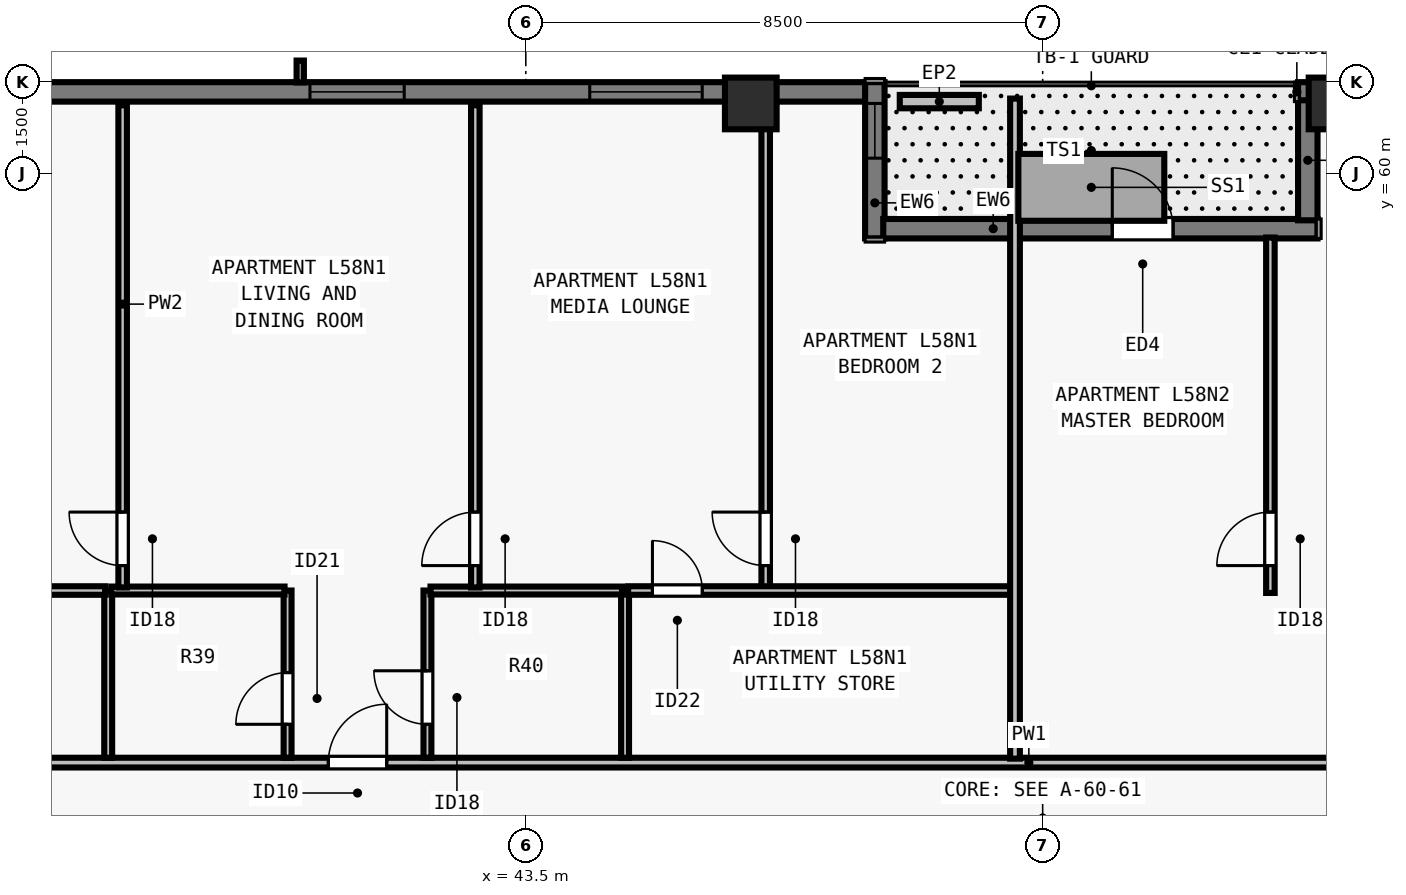
"""IFC4 building model, lengths in metres.
Left out: names, types, materials, properties, quantities, classifications, styles, units other than length and angle.
Written with IfcOpenShell. Run it as: python <this file> out.ifc"""

import sys

from ifc_helpers import new_model, si_unit, direction, frame, frame_2d, origin, origin_2d, place, context, subcontext, project, spatial, rectangle, extrude, element, fill, save


model = new_model("IFC4")
c1 = context("Model", 3, precision=1e-05, world=origin(), true_north=direction((0.0, 1.0)))
c2 = subcontext(c1, "Body", "Model", "MODEL_VIEW")
j1 = project(units=[si_unit("LENGTHUNIT", "METRE"), si_unit("PLANEANGLEUNIT", "RADIAN")], contexts=[c1])
p1 = place(None, origin())
s1 = spatial("IfcSite", under=j1, at=p1, CompositionType="ELEMENT")
p2 = place(p1, origin())
s2 = spatial("IfcBuilding", under=s1, at=p2, CompositionType="ELEMENT")
p3 = place(p2, frame((0.0, 0.0, 213.0)))
s3 = spatial("IfcBuildingStorey", under=s2, at=p3, CompositionType="ELEMENT", Elevation=213.0)
for number, where, z_axis, x_axis in (
    (1, (56.8, 61.15, 0.0), (0.0, 0.0, 1.0), (1.0, 0.0, 0.0)),
    (2, (47.2, 61.15, 0.0), (0.0, 0.0, 1.0), (1.0, 0.0, 0.0)),
):
    element("IfcColumn", number, at=place(p3, frame(where, z_axis=z_axis, x_axis=x_axis)), inside=s3, PredefinedType="COLUMN", context=c2, shape_type="SweptSolid", body=[
        extrude(rectangle(XDim=0.85, YDim=0.85, at=origin_2d()), origin(), (0.0, 0.0, 1.0), 3.5),
    ])
p4 = place(p3, frame((56.2, 61.34, 0.0), z_axis=(0.0, 0.0, 1.0), x_axis=(1.0, 0.0, 0.0)))
e3 = element("IfcWall", 3, at=p4, inside=s3, PredefinedType="SOLIDWALL", context=c2, shape_type="SweptSolid", body=[
    extrude(rectangle(XDim=13.002, YDim=0.32, at=frame_2d((6.501, 0.0))), origin(), (0.0, 0.0, 1.0), 3.29),
])
p5 = place(p4, frame((2.45, 0.0, 0.8)))
e4 = element("IfcOpeningElement", 4, at=p5, cuts=e3, PredefinedType="OPENING", context=c2, shape_type="SweptSolid", body=[
    extrude(rectangle(XDim=1.55, YDim=1.678, at=frame_2d((0.775, 0.839))), frame((0.0, 0.17, 0.0), z_axis=(0.0, -1.0, 0.0), x_axis=(1.0, 0.0, 0.0)), (0.0, 0.0, 1.0), 0.34),
])
p6 = place(p4, frame((5.802, 0.0, 0.8)))
e5 = element("IfcOpeningElement", 5, at=p6, cuts=e3, PredefinedType="OPENING", context=c2, shape_type="SweptSolid", body=[
    extrude(rectangle(XDim=1.85, YDim=1.678, at=frame_2d((0.925, 0.839))), frame((0.0, 0.17, 0.0), z_axis=(0.0, -1.0, 0.0), x_axis=(1.0, 0.0, 0.0)), (0.0, 0.0, 1.0), 0.34),
])
p7 = place(p3, frame((34.5, 61.34, 0.0), z_axis=(0.0, 0.0, 1.0), x_axis=(1.0, 0.0, 0.0)))
e6 = element("IfcWall", 6, at=p7, inside=s3, PredefinedType="SOLIDWALL", context=c2, shape_type="SweptSolid", body=[
    extrude(rectangle(XDim=14.602, YDim=0.32, at=frame_2d((7.301, 0.0))), origin(), (0.0, 0.0, 1.0), 3.29),
])
p8 = place(p7, frame((5.45, 0.0, 0.8)))
e7 = element("IfcOpeningElement", 7, at=p8, cuts=e6, PredefinedType="OPENING", context=c2, shape_type="SweptSolid", body=[
    extrude(rectangle(XDim=1.55, YDim=1.678, at=frame_2d((0.775, 0.839))), frame((0.0, 0.17, 0.0), z_axis=(0.0, -1.0, 0.0), x_axis=(1.0, 0.0, 0.0)), (0.0, 0.0, 1.0), 0.34),
])
p9 = place(p7, frame((10.052, 0.0, 0.8)))
e8 = element("IfcOpeningElement", 8, at=p9, cuts=e6, PredefinedType="OPENING", context=c2, shape_type="SweptSolid", body=[
    extrude(rectangle(XDim=1.85, YDim=1.678, at=frame_2d((0.925, 0.839))), frame((0.0, 0.17, 0.0), z_axis=(0.0, -1.0, 0.0), x_axis=(1.0, 0.0, 0.0)), (0.0, 0.0, 1.0), 0.34),
])
p10 = place(p3, frame((49.24, 61.5, 0.0), z_axis=(0.0, 0.0, 1.0), x_axis=(0.0, -1.0, 0.0)))
e9 = element("IfcWall", 9, at=p10, inside=s3, PredefinedType="SOLIDWALL", context=c2, shape_type="SweptSolid", body=[
    extrude(rectangle(XDim=2.57, YDim=0.32, at=frame_2d((1.285, 0.0))), origin(), (0.0, 0.0, 1.0), 3.29),
])
p11 = place(p10, frame((0.35, 0.0, 0.8)))
e10 = element("IfcOpeningElement", 10, at=p11, cuts=e9, PredefinedType="OPENING", context=c2, shape_type="SweptSolid", body=[
    extrude(rectangle(XDim=0.9, YDim=1.678, at=frame_2d((0.45, 0.839))), frame((0.0, 0.17, 0.0), z_axis=(0.0, -1.0, 0.0), x_axis=(1.0, 0.0, 0.0)), (0.0, 0.0, 1.0), 0.34),
])
p12 = place(p3, frame((49.378, 59.09, 0.0), z_axis=(0.0, 0.0, 1.0), x_axis=(1.0, 0.0, 0.0)))
e11 = element("IfcWall", 11, at=p12, inside=s3, PredefinedType="SOLIDWALL", context=c2, shape_type="SweptSolid", body=[
    extrude(rectangle(XDim=7.142, YDim=0.32, at=frame_2d((3.571, 0.0))), origin(), (0.0, 0.0, 1.0), 3.29),
])
p13 = place(p12, frame((3.767, 0.0, 0.0)))
e12 = element("IfcOpeningElement", 12, at=p13, cuts=e11, PredefinedType="OPENING", context=c2, shape_type="SweptSolid", body=[
    extrude(rectangle(XDim=1.0, YDim=2.15, at=frame_2d((0.5, 1.075))), frame((0.0, 0.17, 0.0), z_axis=(0.0, -1.0, 0.0), x_axis=(1.0, 0.0, 0.0)), (0.0, 0.0, 1.0), 0.34),
])
p14 = place(p3, frame((56.36, 59.228, 0.0), z_axis=(0.0, 0.0, 1.0), x_axis=(0.0, 1.0, 0.0)))
e13 = element("IfcWall", 13, at=p14, inside=s3, PredefinedType="SOLIDWALL", context=c2, shape_type="SweptSolid", body=[
    extrude(rectangle(XDim=1.974, YDim=0.32, at=frame_2d((0.987, 0.0))), origin(), (0.0, 0.0, 1.0), 3.29),
])
p15 = place(p3, frame((49.65, 61.18, 0.0), z_axis=(0.0, 0.0, 1.0), x_axis=(1.0, 0.0, 0.0)))
e14 = element("IfcWall", 14, at=p15, inside=s3, PredefinedType="PARAPET", context=c2, shape_type="SweptSolid", body=[
    extrude(rectangle(XDim=1.3, YDim=0.22, at=frame_2d((0.65, 0.0))), origin(), (0.0, 0.0, 1.0), 0.55),
])
p16 = place(p3, frame((29.805, 50.31, 0.0), z_axis=(0.0, 0.0, 1.0), x_axis=(1.0, 0.0, 0.0)))
e15 = element("IfcWall", 15, at=p16, inside=s3, PredefinedType="PARTITIONING", context=c2, shape_type="SweptSolid", body=[
    extrude(rectangle(XDim=44.39, YDim=0.16, at=frame_2d((22.195, 0.0))), origin(), (0.0, 0.0, 1.0), 2.958),
])
p17 = place(p16, frame((10.448, 0.0, 0.0)))
e16 = element("IfcOpeningElement", 16, at=p17, cuts=e15, PredefinedType="OPENING", context=c2, shape_type="SweptSolid", body=[
    extrude(rectangle(XDim=0.96, YDim=2.18, at=frame_2d((0.48, 1.09))), frame((0.0, 0.09, 0.0), z_axis=(0.0, -1.0, 0.0), x_axis=(1.0, 0.0, 0.0)), (0.0, 0.0, 1.0), 0.18),
])
p18 = place(p16, frame((32.528, 0.0, 0.0)))
e17 = element("IfcOpeningElement", 17, at=p18, cuts=e15, PredefinedType="OPENING", context=c2, shape_type="SweptSolid", body=[
    extrude(rectangle(XDim=0.96, YDim=2.18, at=frame_2d((0.48, 1.09))), frame((0.0, 0.09, 0.0), z_axis=(0.0, -1.0, 0.0), x_axis=(1.0, 0.0, 0.0)), (0.0, 0.0, 1.0), 0.18),
])
p19 = place(p3, frame((36.633, 50.39, 0.0), z_axis=(0.0, 0.0, 1.0), x_axis=(0.0, 1.0, 0.0)))
e18 = element("IfcWall", 18, at=p19, inside=s3, PredefinedType="PLUMBINGWALL", context=c2, shape_type="SweptSolid", body=[
    extrude(rectangle(XDim=2.75, YDim=0.13, at=frame_2d((1.375, 0.0))), origin(), (0.0, 0.0, 1.0), 3.29),
])
p20 = place(p3, frame((39.583, 50.39, 0.0), z_axis=(0.0, 0.0, 1.0), x_axis=(0.0, 1.0, 0.0)))
e19 = element("IfcWall", 19, at=p20, inside=s3, PredefinedType="PLUMBINGWALL", context=c2, shape_type="SweptSolid", body=[
    extrude(rectangle(XDim=2.75, YDim=0.13, at=frame_2d((1.375, 0.0))), origin(), (0.0, 0.0, 1.0), 3.29),
])
p21 = place(p20, frame((0.55, 0.0, 0.0)))
e20 = element("IfcOpeningElement", 20, at=p21, cuts=e19, PredefinedType="OPENING", context=c2, shape_type="SweptSolid", body=[
    extrude(rectangle(XDim=0.85, YDim=2.08, at=frame_2d((0.425, 1.04))), frame((0.0, 0.075, 0.0), z_axis=(0.0, -1.0, 0.0), x_axis=(1.0, 0.0, 0.0)), (0.0, 0.0, 1.0), 0.15),
])
p22 = place(p3, frame((36.683, 53.14, 0.0), z_axis=(0.0, 0.0, 1.0), x_axis=(1.0, 0.0, 0.0)))
e21 = element("IfcWall", 21, at=p22, inside=s3, PredefinedType="PLUMBINGWALL", context=c2, shape_type="SweptSolid", body=[
    extrude(rectangle(XDim=2.85, YDim=0.13, at=frame_2d((1.425, 0.0))), origin(), (0.0, 0.0, 1.0), 3.29),
])
p23 = place(p3, frame((45.133, 50.39, 0.0), z_axis=(0.0, 0.0, 1.0), x_axis=(0.0, 1.0, 0.0)))
e22 = element("IfcWall", 22, at=p23, inside=s3, PredefinedType="PLUMBINGWALL", context=c2, shape_type="SweptSolid", body=[
    extrude(rectangle(XDim=2.75, YDim=0.13, at=frame_2d((1.375, 0.0))), origin(), (0.0, 0.0, 1.0), 3.29),
])
p24 = place(p3, frame((41.883, 50.39, 0.0), z_axis=(0.0, 0.0, 1.0), x_axis=(0.0, 1.0, 0.0)))
e23 = element("IfcWall", 23, at=p24, inside=s3, PredefinedType="PLUMBINGWALL", context=c2, shape_type="SweptSolid", body=[
    extrude(rectangle(XDim=2.75, YDim=0.13, at=frame_2d((1.375, 0.0))), origin(), (0.0, 0.0, 1.0), 3.29),
])
p25 = place(p24, frame((0.55, 0.0, 0.0)))
e24 = element("IfcOpeningElement", 24, at=p25, cuts=e23, PredefinedType="OPENING", context=c2, shape_type="SweptSolid", body=[
    extrude(rectangle(XDim=0.88, YDim=2.1, at=frame_2d((0.44, 1.05))), frame((0.0, 0.075, 0.0), z_axis=(0.0, -1.0, 0.0), x_axis=(1.0, 0.0, 0.0)), (0.0, 0.0, 1.0), 0.15),
])
p26 = place(p3, frame((41.933, 53.14, 0.0), z_axis=(0.0, 0.0, 1.0), x_axis=(1.0, 0.0, 0.0)))
e25 = element("IfcWall", 25, at=p26, inside=s3, PredefinedType="PLUMBINGWALL", context=c2, shape_type="SweptSolid", body=[
    extrude(rectangle(XDim=3.15, YDim=0.13, at=frame_2d((1.575, 0.0))), origin(), (0.0, 0.0, 1.0), 3.29),
])
p27 = place(p3, frame((36.87, 53.19, 0.0), z_axis=(0.0, 0.0, 1.0), x_axis=(0.0, 1.0, 0.0)))
e26 = element("IfcWall", 26, at=p27, inside=s3, PredefinedType="PARTITIONING", context=c2, shape_type="SweptSolid", body=[
    extrude(rectangle(XDim=7.93, YDim=0.14, at=frame_2d((3.965, 0.0))), origin(), (0.0, 0.0, 1.0), 2.573),
])
p28 = place(p27, frame((0.36, 0.0, 0.0)))
e27 = element("IfcOpeningElement", 27, at=p28, cuts=e26, PredefinedType="OPENING", context=c2, shape_type="SweptSolid", body=[
    extrude(rectangle(XDim=0.88, YDim=2.1, at=frame_2d((0.44, 1.05))), frame((0.0, 0.08, 0.0), z_axis=(0.0, -1.0, 0.0), x_axis=(1.0, 0.0, 0.0)), (0.0, 0.0, 1.0), 0.16),
])
p29 = place(p3, frame((29.87, 53.14, 0.0), z_axis=(0.0, 0.0, 1.0), x_axis=(1.0, 0.0, 0.0)))
e28 = element("IfcWall", 28, at=p29, inside=s3, PredefinedType="PARTITIONING", context=c2, shape_type="SweptSolid", body=[
    extrude(rectangle(XDim=6.712, YDim=0.14, at=frame_2d((3.356, 0.0))), origin(), (0.0, 0.0, 1.0), 2.958),
])
p30 = place(p29, frame((0.45, 0.0, 0.0)))
e29 = element("IfcOpeningElement", 29, at=p30, cuts=e28, PredefinedType="OPENING", context=c2, shape_type="SweptSolid", body=[
    extrude(rectangle(XDim=0.82, YDim=2.1, at=frame_2d((0.41, 1.05))), frame((0.0, 0.08, 0.0), z_axis=(0.0, -1.0, 0.0), x_axis=(1.0, 0.0, 0.0)), (0.0, 0.0, 1.0), 0.16),
])
p31 = place(p3, frame((47.445, 53.1, 0.0), z_axis=(0.0, 0.0, 1.0), x_axis=(0.0, 1.0, 0.0)))
e30 = element("IfcWall", 30, at=p31, inside=s3, PredefinedType="PARTITIONING", context=c2, shape_type="SweptSolid", body=[
    extrude(rectangle(XDim=8.02, YDim=0.14, at=frame_2d((4.01, 0.0))), origin(), (0.0, 0.0, 1.0), 3.29),
])
p32 = place(p31, frame((0.45, 0.0, 0.0)))
e31 = element("IfcOpeningElement", 31, at=p32, cuts=e30, PredefinedType="OPENING", context=c2, shape_type="SweptSolid", body=[
    extrude(rectangle(XDim=0.88, YDim=2.1, at=frame_2d((0.44, 1.05))), frame((0.0, 0.08, 0.0), z_axis=(0.0, -1.0, 0.0), x_axis=(1.0, 0.0, 0.0)), (0.0, 0.0, 1.0), 0.16),
])
p33 = place(p3, frame((45.183, 53.14, 0.0), z_axis=(0.0, 0.0, 1.0), x_axis=(1.0, 0.0, 0.0)))
e32 = element("IfcWall", 32, at=p33, inside=s3, PredefinedType="PARTITIONING", context=c2, shape_type="SweptSolid", body=[
    extrude(rectangle(XDim=6.412, YDim=0.14, at=frame_2d((3.206, 0.0))), origin(), (0.0, 0.0, 1.0), 3.29),
])
p34 = place(p33, frame((0.4, 0.0, 0.0)))
e33 = element("IfcOpeningElement", 33, at=p34, cuts=e32, PredefinedType="OPENING", context=c2, shape_type="SweptSolid", body=[
    extrude(rectangle(XDim=0.82, YDim=2.1, at=frame_2d((0.41, 1.05))), frame((0.0, 0.08, 0.0), z_axis=(0.0, -1.0, 0.0), x_axis=(1.0, 0.0, 0.0)), (0.0, 0.0, 1.0), 0.16),
])
p35 = place(p3, frame((42.67, 53.19, 0.0), z_axis=(0.0, 0.0, 1.0), x_axis=(0.0, 1.0, 0.0)))
e34 = element("IfcWall", 34, at=p35, inside=s3, PredefinedType="PARTITIONING", context=c2, shape_type="SweptSolid", body=[
    extrude(rectangle(XDim=7.93, YDim=0.14, at=frame_2d((3.965, 0.0))), origin(), (0.0, 0.0, 1.0), 3.29),
])
p36 = place(p35, frame((0.36, 0.0, 0.0)))
e35 = element("IfcOpeningElement", 35, at=p36, cuts=e34, PredefinedType="OPENING", context=c2, shape_type="SweptSolid", body=[
    extrude(rectangle(XDim=0.88, YDim=2.1, at=frame_2d((0.44, 1.05))), frame((0.0, 0.08, 0.0), z_axis=(0.0, -1.0, 0.0), x_axis=(1.0, 0.0, 0.0)), (0.0, 0.0, 1.0), 0.16),
])
p37 = place(p3, frame((51.545, 50.375, 0.0), z_axis=(0.0, 0.0, 1.0), x_axis=(0.0, 1.0, 0.0)))
e36 = element("IfcWall", 36, at=p37, inside=s3, PredefinedType="PARTITIONING", context=c2, shape_type="SweptSolid", body=[
    extrude(rectangle(XDim=10.855, YDim=0.16, at=frame_2d((5.427, 0.0))), origin(), (0.0, 0.0, 1.0), 2.958),
])
p38 = place(p3, frame((55.745, 53.1, 0.0), z_axis=(0.0, 0.0, 1.0), x_axis=(0.0, 1.0, 0.0)))
e37 = element("IfcWall", 37, at=p38, inside=s3, PredefinedType="PARTITIONING", context=c2, shape_type="SweptSolid", body=[
    extrude(rectangle(XDim=5.845, YDim=0.14, at=frame_2d((2.922, 0.0))), origin(), (0.0, 0.0, 1.0), 3.29),
])
p39 = place(p38, frame((0.45, 0.0, 0.0)))
e38 = element("IfcOpeningElement", 38, at=p39, cuts=e37, PredefinedType="OPENING", context=c2, shape_type="SweptSolid", body=[
    extrude(rectangle(XDim=0.88, YDim=2.1, at=frame_2d((0.44, 1.05))), frame((0.0, 0.08, 0.0), z_axis=(0.0, -1.0, 0.0), x_axis=(1.0, 0.0, 0.0)), (0.0, 0.0, 1.0), 0.16),
])
p40 = place(p8, origin())
e39 = element("IfcWindow", 39, at=p40, inside=s3, PartitioningType="SINGLE_PANEL", PredefinedType="WINDOW", context=c2, shape_type="SweptSolid", body=[
    extrude(rectangle(XDim=1.55, YDim=1.678, at=frame_2d((0.775, 0.839))), frame((0.0, -0.05, 0.0), z_axis=(0.0, -1.0, 0.0), x_axis=(1.0, 0.0, 0.0)), (0.0, 0.0, 1.0), 0.06),
])
fill(e7, e39)
p41 = place(p9, origin())
e40 = element("IfcWindow", 40, at=p41, inside=s3, PartitioningType="SINGLE_PANEL", PredefinedType="WINDOW", context=c2, shape_type="SweptSolid", body=[
    extrude(rectangle(XDim=1.85, YDim=1.678, at=frame_2d((0.925, 0.839))), frame((0.0, -0.05, 0.0), z_axis=(0.0, -1.0, 0.0), x_axis=(1.0, 0.0, 0.0)), (0.0, 0.0, 1.0), 0.06),
])
fill(e8, e40)
p42 = place(p13, origin())
e41 = element("IfcDoor", 41, at=p42, inside=s3, OperationType="SINGLE_SWING_LEFT", PredefinedType="DOOR", context=c2, shape_type="SweptSolid", body=[
    extrude(rectangle(XDim=1.0, YDim=2.15, at=frame_2d((0.5, 1.075))), frame((0.0, 0.025, 0.0), z_axis=(0.0, -1.0, 0.0), x_axis=(1.0, 0.0, 0.0)), (0.0, 0.0, 1.0), 0.05),
])
fill(e12, e41)
p43 = place(p11, origin())
e42 = element("IfcWindow", 42, at=p43, inside=s3, PartitioningType="SINGLE_PANEL", PredefinedType="WINDOW", context=c2, shape_type="SweptSolid", body=[
    extrude(rectangle(XDim=0.9, YDim=1.678, at=frame_2d((0.45, 0.839))), frame((0.0, -0.04, 0.0), z_axis=(0.0, -1.0, 0.0), x_axis=(1.0, 0.0, 0.0)), (0.0, 0.0, 1.0), 0.06),
])
fill(e10, e42)
p44 = place(p21, origin())
e43 = element("IfcDoor", 43, at=p44, inside=s3, OperationType="SINGLE_SWING_LEFT", PredefinedType="DOOR", context=c2, shape_type="SweptSolid", body=[
    extrude(rectangle(XDim=0.85, YDim=2.08, at=frame_2d((0.425, 1.04))), frame((0.0, 0.025, 0.0), z_axis=(0.0, -1.0, 0.0), x_axis=(1.0, 0.0, 0.0)), (0.0, 0.0, 1.0), 0.05),
])
fill(e20, e43)
p45 = place(p25, origin())
e44 = element("IfcDoor", 44, at=p45, inside=s3, OperationType="SINGLE_SWING_RIGHT", PredefinedType="DOOR", context=c2, shape_type="SweptSolid", body=[
    extrude(rectangle(XDim=0.88, YDim=2.1, at=frame_2d((0.44, 1.05))), frame((0.0, 0.025, 0.0), z_axis=(0.0, -1.0, 0.0), x_axis=(1.0, 0.0, 0.0)), (0.0, 0.0, 1.0), 0.05),
])
fill(e24, e44)
p46 = place(p28, origin())
e45 = element("IfcDoor", 45, at=p46, inside=s3, OperationType="SINGLE_SWING_RIGHT", PredefinedType="DOOR", context=c2, shape_type="SweptSolid", body=[
    extrude(rectangle(XDim=0.88, YDim=2.1, at=frame_2d((0.44, 1.05))), frame((0.0, 0.025, 0.0), z_axis=(0.0, -1.0, 0.0), x_axis=(1.0, 0.0, 0.0)), (0.0, 0.0, 1.0), 0.05),
])
fill(e27, e45)
p47 = place(p34, origin())
e46 = element("IfcDoor", 46, at=p47, inside=s3, OperationType="SINGLE_SWING_LEFT", PredefinedType="DOOR", context=c2, shape_type="SweptSolid", body=[
    extrude(rectangle(XDim=0.82, YDim=2.1, at=frame_2d((0.41, 1.05))), frame((0.0, 0.025, 0.0), z_axis=(0.0, -1.0, 0.0), x_axis=(1.0, 0.0, 0.0)), (0.0, 0.0, 1.0), 0.05),
])
fill(e33, e46)
p48 = place(p32, origin())
e47 = element("IfcDoor", 47, at=p48, inside=s3, OperationType="SINGLE_SWING_RIGHT", PredefinedType="DOOR", context=c2, shape_type="SweptSolid", body=[
    extrude(rectangle(XDim=0.88, YDim=2.1, at=frame_2d((0.44, 1.05))), frame((0.0, 0.025, 0.0), z_axis=(0.0, -1.0, 0.0), x_axis=(1.0, 0.0, 0.0)), (0.0, 0.0, 1.0), 0.05),
])
fill(e31, e47)
p49 = place(p36, origin())
e48 = element("IfcDoor", 48, at=p49, inside=s3, OperationType="SINGLE_SWING_LEFT", PredefinedType="DOOR", context=c2, shape_type="SweptSolid", body=[
    extrude(rectangle(XDim=0.88, YDim=2.1, at=frame_2d((0.44, 1.05))), frame((0.0, 0.025, 0.0), z_axis=(0.0, -1.0, 0.0), x_axis=(1.0, 0.0, 0.0)), (0.0, 0.0, 1.0), 0.05),
])
fill(e35, e48)
p50 = place(p17, origin())
e49 = element("IfcDoor", 49, at=p50, inside=s3, OperationType="SINGLE_SWING_RIGHT", PredefinedType="DOOR", context=c2, shape_type="SweptSolid", body=[
    extrude(rectangle(XDim=0.96, YDim=2.18, at=frame_2d((0.48, 1.09))), frame((0.0, 0.025, 0.0), z_axis=(0.0, -1.0, 0.0), x_axis=(1.0, 0.0, 0.0)), (0.0, 0.0, 1.0), 0.05),
])
fill(e16, e49)
p51 = place(p39, origin())
e50 = element("IfcDoor", 50, at=p51, inside=s3, OperationType="SINGLE_SWING_LEFT", PredefinedType="DOOR", context=c2, shape_type="SweptSolid", body=[
    extrude(rectangle(XDim=0.88, YDim=2.1, at=frame_2d((0.44, 1.05))), frame((0.0, 0.025, 0.0), z_axis=(0.0, -1.0, 0.0), x_axis=(1.0, 0.0, 0.0)), (0.0, 0.0, 1.0), 0.05),
])
fill(e38, e50)
save(model, sys.argv[1])
